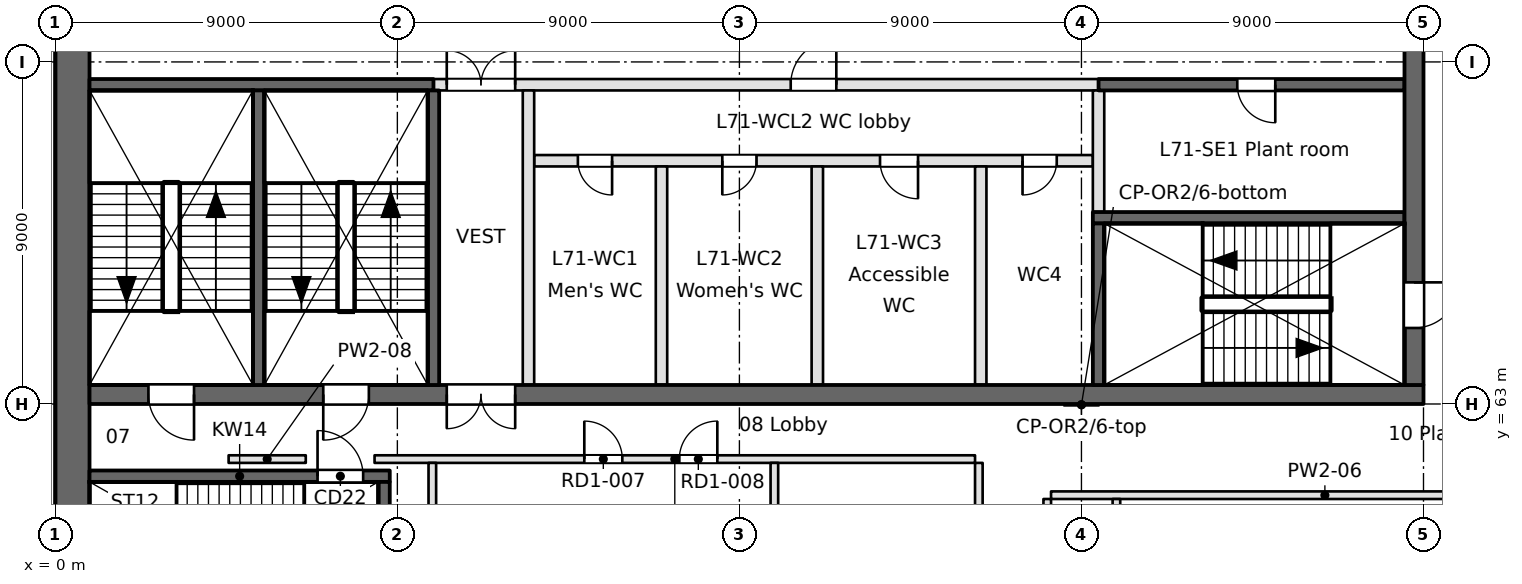
"""IFC4 building model, lengths in metres.
Left out: names, types, materials, properties, quantities, classifications, styles, units other than length and angle.
Written with IfcOpenShell. Run it as: python <this file> out.ifc"""

import sys

from ifc_helpers import new_model, si_unit, direction, frame, frame_2d, origin, place, context, subcontext, project, spatial, rectangle, extrude, element, fill, save


model = new_model("IFC4")
c1 = context("Model", 3, precision=1e-05, world=origin(), true_north=direction((0.0, 1.0)))
c2 = subcontext(c1, "Body", "Model", "MODEL_VIEW")
j1 = project(units=[si_unit("LENGTHUNIT", "METRE"), si_unit("PLANEANGLEUNIT", "RADIAN")], contexts=[c1])
p1 = place(None, origin())
s1 = spatial("IfcSite", under=j1, at=p1, CompositionType="ELEMENT")
p2 = place(p1, origin())
s2 = spatial("IfcBuilding", under=s1, at=p2, CompositionType="ELEMENT")
p3 = place(p2, frame((0.0, 0.0, 276.2)))
s3 = spatial("IfcBuildingStorey", under=s2, at=p3, CompositionType="ELEMENT", Elevation=276.2)
p4 = place(p3, frame((0.45, 94.5, 0.0), z_axis=(0.0, 0.0, 1.0), x_axis=(0.0, -1.0, 0.0)))
e1 = element("IfcWall", 1, at=p4, inside=s3, PredefinedType="SHEAR", context=c2, shape_type="SweptSolid", body=[
    extrude(rectangle(XDim=40.456, YDim=0.9, at=frame_2d((20.228, 0.0))), origin(), (0.0, 0.0, 1.0), 4.6),
])
p5 = place(p3, frame((0.9, 61.1, -0.45), z_axis=(0.0, 0.0, 1.0), x_axis=(1.0, 0.0, 0.0)))
e2 = element("IfcWall", 2, at=p5, inside=s3, PredefinedType="SOLIDWALL", context=c2, shape_type="SweptSolid", body=[
    extrude(rectangle(XDim=7.9, YDim=0.3, at=frame_2d((3.95, 0.0))), origin(), (0.0, 0.0, 1.0), 4.65),
])
p6 = place(p5, frame((6.0, 0.0, 0.45)))
e3 = element("IfcOpeningElement", 3, at=p6, cuts=e2, PredefinedType="OPENING", context=c2, shape_type="SweptSolid", body=[
    extrude(rectangle(XDim=1.2, YDim=2.1, at=frame_2d((0.6, 1.05))), frame((0.0, 0.15, 0.0), z_axis=(0.0, -1.0, 0.0), x_axis=(1.0, 0.0, 0.0)), (0.0, 0.0, 1.0), 0.3),
])
p7 = place(p3, frame((0.9, 63.25, -0.45), z_axis=(0.0, 0.0, 1.0), x_axis=(1.0, 0.0, 0.0)))
e4 = element("IfcWall", 4, at=p7, inside=s3, PredefinedType="SOLIDWALL", context=c2, shape_type="SweptSolid", body=[
    extrude(rectangle(XDim=35.1, YDim=0.5, at=frame_2d((17.55, 0.0))), origin(), (0.0, 0.0, 1.0), 4.65),
])
p8 = place(p7, frame((9.4, 0.0, 0.45)))
e5 = element("IfcOpeningElement", 5, at=p8, cuts=e4, PredefinedType="OPENING", context=c2, shape_type="SweptSolid", body=[
    extrude(rectangle(XDim=1.8, YDim=2.1, at=frame_2d((0.9, 1.05))), frame((0.0, 0.25, 0.0), z_axis=(0.0, -1.0, 0.0), x_axis=(1.0, 0.0, 0.0)), (0.0, 0.0, 1.0), 0.5),
])
p9 = place(p7, frame((1.55, 0.0, 0.45)))
e6 = element("IfcOpeningElement", 6, at=p9, cuts=e4, PredefinedType="OPENING", context=c2, shape_type="SweptSolid", body=[
    extrude(rectangle(XDim=1.2, YDim=2.1, at=frame_2d((0.6, 1.05))), frame((0.0, 0.25, 0.0), z_axis=(0.0, -1.0, 0.0), x_axis=(1.0, 0.0, 0.0)), (0.0, 0.0, 1.0), 0.5),
])
p10 = place(p7, frame((6.15, 0.0, 0.45)))
e7 = element("IfcOpeningElement", 7, at=p10, cuts=e4, PredefinedType="OPENING", context=c2, shape_type="SweptSolid", body=[
    extrude(rectangle(XDim=1.2, YDim=2.1, at=frame_2d((0.6, 1.05))), frame((0.0, 0.25, 0.0), z_axis=(0.0, -1.0, 0.0), x_axis=(1.0, 0.0, 0.0)), (0.0, 0.0, 1.0), 0.5),
])
p11 = place(p3, frame((27.3, 67.9, -0.45), z_axis=(0.0, 0.0, 1.0), x_axis=(1.0, 0.0, 0.0)))
e8 = element("IfcWall", 8, at=p11, inside=s3, PredefinedType="SOLIDWALL", context=c2, shape_type="SweptSolid", body=[
    extrude(rectangle(XDim=8.2, YDim=0.3, at=frame_2d((4.1, 0.0))), origin(), (0.0, 0.0, 1.0), 4.65),
])
p12 = place(p3, frame((12.6, 69.4, 0.0), z_axis=(0.0, 0.0, 1.0), x_axis=(1.0, 0.0, 0.0)))
e9 = element("IfcWall", 9, at=p12, inside=s3, PredefinedType="PARTITIONING", context=c2, shape_type="SweptSolid", body=[
    extrude(rectangle(XDim=14.7, YDim=0.3, at=frame_2d((7.35, 0.0))), origin(), (0.0, 0.0, 1.0), 4.2),
])
p13 = place(p12, frame((1.15, 0.0, 0.0)))
e10 = element("IfcOpeningElement", 10, at=p13, cuts=e9, PredefinedType="OPENING", context=c2, shape_type="SweptSolid", body=[
    extrude(rectangle(XDim=0.9, YDim=2.1, at=frame_2d((0.45, 1.05))), frame((0.0, 0.15, 0.0), z_axis=(0.0, -1.0, 0.0), x_axis=(1.0, 0.0, 0.0)), (0.0, 0.0, 1.0), 0.3),
])
p14 = place(p12, frame((4.95, 0.0, 0.0)))
e11 = element("IfcOpeningElement", 11, at=p14, cuts=e9, PredefinedType="OPENING", context=c2, shape_type="SweptSolid", body=[
    extrude(rectangle(XDim=0.9, YDim=2.1, at=frame_2d((0.45, 1.05))), frame((0.0, 0.15, 0.0), z_axis=(0.0, -1.0, 0.0), x_axis=(1.0, 0.0, 0.0)), (0.0, 0.0, 1.0), 0.3),
])
p15 = place(p12, frame((9.1, 0.0, 0.0)))
e12 = element("IfcOpeningElement", 12, at=p15, cuts=e9, PredefinedType="OPENING", context=c2, shape_type="SweptSolid", body=[
    extrude(rectangle(XDim=1.0, YDim=2.1, at=frame_2d((0.5, 1.05))), frame((0.0, 0.15, 0.0), z_axis=(0.0, -1.0, 0.0), x_axis=(1.0, 0.0, 0.0)), (0.0, 0.0, 1.0), 0.3),
])
p16 = place(p12, frame((12.85, 0.0, 0.0)))
e13 = element("IfcOpeningElement", 13, at=p16, cuts=e9, PredefinedType="OPENING", context=c2, shape_type="SweptSolid", body=[
    extrude(rectangle(XDim=0.9, YDim=2.1, at=frame_2d((0.45, 1.05))), frame((0.0, 0.15, 0.0), z_axis=(0.0, -1.0, 0.0), x_axis=(1.0, 0.0, 0.0)), (0.0, 0.0, 1.0), 0.3),
])
p17 = place(p3, frame((0.9, 71.4, -0.45), z_axis=(0.0, 0.0, 1.0), x_axis=(1.0, 0.0, 0.0)))
e14 = element("IfcWall", 14, at=p17, inside=s3, PredefinedType="SOLIDWALL", context=c2, shape_type="SweptSolid", body=[
    extrude(rectangle(XDim=9.05, YDim=0.3, at=frame_2d((4.525, 0.0))), origin(), (0.0, 0.0, 1.0), 4.65),
])
p18 = place(p3, frame((9.95, 71.4, 0.0), z_axis=(0.0, 0.0, 1.0), x_axis=(1.0, 0.0, 0.0)))
e15 = element("IfcWall", 15, at=p18, inside=s3, PredefinedType="PARTITIONING", context=c2, shape_type="SweptSolid", body=[
    extrude(rectangle(XDim=17.5, YDim=0.3, at=frame_2d((8.75, 0.0))), origin(), (0.0, 0.0, 1.0), 4.2),
])
p19 = place(p18, frame((0.35, 0.0, 0.0)))
e16 = element("IfcOpeningElement", 16, at=p19, cuts=e15, PredefinedType="OPENING", context=c2, shape_type="SweptSolid", body=[
    extrude(rectangle(XDim=1.8, YDim=2.1, at=frame_2d((0.9, 1.05))), frame((0.0, 0.15, 0.0), z_axis=(0.0, -1.0, 0.0), x_axis=(1.0, 0.0, 0.0)), (0.0, 0.0, 1.0), 0.3),
])
p20 = place(p18, frame((9.4, 0.0, 0.0)))
e17 = element("IfcOpeningElement", 17, at=p20, cuts=e15, PredefinedType="OPENING", context=c2, shape_type="SweptSolid", body=[
    extrude(rectangle(XDim=1.2, YDim=2.1, at=frame_2d((0.6, 1.05))), frame((0.0, 0.15, 0.0), z_axis=(0.0, -1.0, 0.0), x_axis=(1.0, 0.0, 0.0)), (0.0, 0.0, 1.0), 0.3),
])
p21 = place(p3, frame((27.45, 71.4, 0.0), z_axis=(0.0, 0.0, 1.0), x_axis=(1.0, 0.0, 0.0)))
e18 = element("IfcWall", 18, at=p21, inside=s3, PredefinedType="SOLIDWALL", context=c2, shape_type="SweptSolid", body=[
    extrude(rectangle(XDim=8.05, YDim=0.3, at=frame_2d((4.025, 0.0))), origin(), (0.0, 0.0, 1.0), 4.2),
])
p22 = place(p21, frame((3.65, 0.0, 0.0)))
e19 = element("IfcOpeningElement", 19, at=p22, cuts=e18, PredefinedType="OPENING", context=c2, shape_type="SweptSolid", body=[
    extrude(rectangle(XDim=1.0, YDim=2.1, at=frame_2d((0.5, 1.05))), frame((0.0, 0.15, 0.0), z_axis=(0.0, -1.0, 0.0), x_axis=(1.0, 0.0, 0.0)), (0.0, 0.0, 1.0), 0.3),
])
p23 = place(p3, frame((5.35, 63.5, -0.45), z_axis=(0.0, 0.0, 1.0), x_axis=(0.0, 1.0, 0.0)))
e20 = element("IfcWall", 20, at=p23, inside=s3, PredefinedType="SOLIDWALL", context=c2, shape_type="SweptSolid", body=[
    extrude(rectangle(XDim=7.75, YDim=0.3, at=frame_2d((3.875, 0.0))), origin(), (0.0, 0.0, 1.0), 4.65),
])
p24 = place(p3, frame((8.65, 56.65, -0.45), z_axis=(0.0, 0.0, 1.0), x_axis=(0.0, 1.0, 0.0)))
e21 = element("IfcWall", 21, at=p24, inside=s3, PredefinedType="SOLIDWALL", context=c2, shape_type="SweptSolid", body=[
    extrude(rectangle(XDim=4.3, YDim=0.3, at=frame_2d((2.15, 0.0))), origin(), (0.0, 0.0, 1.0), 4.65),
])
p25 = place(p3, frame((9.95, 63.5, -0.45), z_axis=(0.0, 0.0, 1.0), x_axis=(0.0, 1.0, 0.0)))
e22 = element("IfcWall", 22, at=p25, inside=s3, PredefinedType="SOLIDWALL", context=c2, shape_type="SweptSolid", body=[
    extrude(rectangle(XDim=7.75, YDim=0.3, at=frame_2d((3.875, 0.0))), origin(), (0.0, 0.0, 1.0), 4.65),
])
p26 = place(p3, frame((12.45, 63.5, 0.0), z_axis=(0.0, 0.0, 1.0), x_axis=(0.0, 1.0, 0.0)))
e23 = element("IfcWall", 23, at=p26, inside=s3, PredefinedType="PARTITIONING", context=c2, shape_type="SweptSolid", body=[
    extrude(rectangle(XDim=7.75, YDim=0.3, at=frame_2d((3.875, 0.0))), origin(), (0.0, 0.0, 1.0), 4.2),
])
for number, where, z_axis, x_axis in (
    (24, (15.95, 63.5, 0.0), (0.0, 0.0, 1.0), (0.0, 1.0, 0.0)),
    (25, (20.05, 63.5, 0.0), (0.0, 0.0, 1.0), (0.0, 1.0, 0.0)),
    (26, (24.35, 63.5, 0.0), (0.0, 0.0, 1.0), (0.0, 1.0, 0.0)),
):
    element("IfcWall", number, at=place(p3, frame(where, z_axis=z_axis, x_axis=x_axis)), inside=s3, PredefinedType="PARTITIONING", context=c2, shape_type="SweptSolid", body=[
        extrude(rectangle(XDim=5.75, YDim=0.3, at=frame_2d((2.875, 0.0))), origin(), (0.0, 0.0, 1.0), 4.2),
    ])
p27 = place(p3, frame((27.45, 63.5, -0.45), z_axis=(0.0, 0.0, 1.0), x_axis=(0.0, 1.0, 0.0)))
e27 = element("IfcWall", 27, at=p27, inside=s3, PredefinedType="SOLIDWALL", context=c2, shape_type="SweptSolid", body=[
    extrude(rectangle(XDim=4.25, YDim=0.3, at=frame_2d((2.125, 0.0))), origin(), (0.0, 0.0, 1.0), 4.65),
])
p28 = place(p3, frame((27.45, 68.05, 0.0), z_axis=(0.0, 0.0, 1.0), x_axis=(0.0, 1.0, 0.0)))
e28 = element("IfcWall", 28, at=p28, inside=s3, PredefinedType="PARTITIONING", context=c2, shape_type="SweptSolid", body=[
    extrude(rectangle(XDim=3.2, YDim=0.3, at=frame_2d((1.6, 0.0))), origin(), (0.0, 0.0, 1.0), 4.2),
])
p29 = place(p3, frame((35.75, 63.5, -0.45), z_axis=(0.0, 0.0, 1.0), x_axis=(0.0, 1.0, 0.0)))
e29 = element("IfcWall", 29, at=p29, inside=s3, PredefinedType="SOLIDWALL", context=c2, shape_type="SweptSolid", body=[
    extrude(rectangle(XDim=34.6, YDim=0.5, at=frame_2d((17.3, 0.0))), origin(), (0.0, 0.0, 1.0), 4.65),
])
p30 = place(p29, frame((9.7, 0.0, 0.45)))
e30 = element("IfcOpeningElement", 30, at=p30, cuts=e29, PredefinedType="OPENING", context=c2, shape_type="SweptSolid", body=[
    extrude(rectangle(XDim=2.4, YDim=2.1, at=frame_2d((1.2, 1.05))), frame((0.0, 0.25, 0.0), z_axis=(0.0, -1.0, 0.0), x_axis=(1.0, 0.0, 0.0)), (0.0, 0.0, 1.0), 0.5),
])
p31 = place(p29, frame((27.9, 0.0, 0.45)))
e31 = element("IfcOpeningElement", 31, at=p31, cuts=e29, PredefinedType="OPENING", context=c2, shape_type="SweptSolid", body=[
    extrude(rectangle(XDim=1.5, YDim=2.1, at=frame_2d((0.75, 1.05))), frame((0.0, 0.25, 0.0), z_axis=(0.0, -1.0, 0.0), x_axis=(1.0, 0.0, 0.0)), (0.0, 0.0, 1.0), 0.5),
])
p32 = place(p29, frame((1.5, 0.0, 0.45)))
e32 = element("IfcOpeningElement", 32, at=p32, cuts=e29, PredefinedType="OPENING", context=c2, shape_type="SweptSolid", body=[
    extrude(rectangle(XDim=1.2, YDim=2.1, at=frame_2d((0.6, 1.05))), frame((0.0, 0.25, 0.0), z_axis=(0.0, -1.0, 0.0), x_axis=(1.0, 0.0, 0.0)), (0.0, 0.0, 1.0), 0.5),
])
p33 = place(p3, frame((40.611, 60.6, 0.0), z_axis=(0.0, 0.0, 1.0), x_axis=(-1.0, 0.0, 0.0)))
e33 = element("IfcWall", 33, at=p33, inside=s3, PredefinedType="PARTITIONING", context=c2, shape_type="SweptSolid", body=[
    extrude(rectangle(XDim=14.411, YDim=0.2, at=frame_2d((7.206, 0.0))), origin(), (0.0, 0.0, 1.0), 4.2),
])
p34 = place(p3, frame((24.2, 61.55, 0.0), z_axis=(0.0, 0.0, 1.0), x_axis=(-1.0, 0.0, 0.0)))
e34 = element("IfcWall", 34, at=p34, inside=s3, PredefinedType="PARTITIONING", context=c2, shape_type="SweptSolid", body=[
    extrude(rectangle(XDim=15.8, YDim=0.2, at=frame_2d((7.9, 0.0))), origin(), (0.0, 0.0, 1.0), 4.2),
])
p35 = place(p34, frame((9.281, 0.0, 0.0)))
e35 = element("IfcOpeningElement", 35, at=p35, cuts=e34, PredefinedType="OPENING", context=c2, shape_type="SweptSolid", body=[
    extrude(rectangle(XDim=1.0, YDim=2.1, at=frame_2d((0.5, 1.05))), frame((0.0, 0.1, 0.0), z_axis=(0.0, -1.0, 0.0), x_axis=(1.0, 0.0, 0.0)), (0.0, 0.0, 1.0), 0.2),
])
p36 = place(p34, frame((6.781, 0.0, 0.0)))
e36 = element("IfcOpeningElement", 36, at=p36, cuts=e34, PredefinedType="OPENING", context=c2, shape_type="SweptSolid", body=[
    extrude(rectangle(XDim=1.0, YDim=2.1, at=frame_2d((0.5, 1.05))), frame((0.0, 0.1, 0.0), z_axis=(0.0, -1.0, 0.0), x_axis=(1.0, 0.0, 0.0)), (0.0, 0.0, 1.0), 0.2),
])
p37 = place(p3, frame((6.59, 61.55, 0.0), z_axis=(0.0, 0.0, 1.0), x_axis=(-1.0, 0.0, 0.0)))
e37 = element("IfcWall", 37, at=p37, inside=s3, PredefinedType="PARTITIONING", context=c2, shape_type="SweptSolid", body=[
    extrude(rectangle(XDim=2.03, YDim=0.2, at=frame_2d((1.015, 0.0))), origin(), (0.0, 0.0, 1.0), 4.2),
])
p38 = place(p3, frame((9.92, 38.818, 0.0), z_axis=(0.0, 0.0, 1.0), x_axis=(0.0, 1.0, 0.0)))
e38 = element("IfcWall", 38, at=p38, inside=s3, PredefinedType="PARTITIONING", context=c2, shape_type="SweptSolid", body=[
    extrude(rectangle(XDim=22.632, YDim=0.2, at=frame_2d((11.316, 0.0))), origin(), (0.0, 0.0, 1.0), 4.2),
])
p39 = place(p38, frame((10.942, 0.0, 0.0)))
e39 = element("IfcOpeningElement", 39, at=p39, cuts=e38, PredefinedType="OPENING", context=c2, shape_type="SweptSolid", body=[
    extrude(rectangle(XDim=1.0, YDim=2.1, at=frame_2d((0.5, 1.05))), frame((0.0, 0.1, 0.0), z_axis=(0.0, -1.0, 0.0), x_axis=(1.0, 0.0, 0.0)), (0.0, 0.0, 1.0), 0.2),
])
p40 = place(p38, frame((13.442, 0.0, 0.0)))
e40 = element("IfcOpeningElement", 40, at=p40, cuts=e38, PredefinedType="OPENING", context=c2, shape_type="SweptSolid", body=[
    extrude(rectangle(XDim=1.0, YDim=2.1, at=frame_2d((0.5, 1.05))), frame((0.0, 0.1, 0.0), z_axis=(0.0, -1.0, 0.0), x_axis=(1.0, 0.0, 0.0)), (0.0, 0.0, 1.0), 0.2),
])
p41 = place(p3, frame((18.92, 61.45, 0.0), z_axis=(0.0, 0.0, 1.0), x_axis=(0.0, -1.0, 0.0)))
e41 = element("IfcWall", 41, at=p41, inside=s3, PredefinedType="PARTITIONING", context=c2, shape_type="SweptSolid", body=[
    extrude(rectangle(XDim=26.735, YDim=0.2, at=frame_2d((13.367, 0.0))), origin(), (0.0, 0.0, 1.0), 4.2),
])
p42 = place(p3, frame((24.3, 46.1, 0.0), z_axis=(0.0, 0.0, 1.0), x_axis=(0.0, 1.0, 0.0)))
e42 = element("IfcWall", 42, at=p42, inside=s3, PredefinedType="PARTITIONING", context=c2, shape_type="SweptSolid", body=[
    extrude(rectangle(XDim=15.35, YDim=0.2, at=frame_2d((7.675, 0.0))), origin(), (0.0, 0.0, 1.0), 4.2),
])
p43 = place(p42, frame((7.175, 0.0, 0.0)))
e43 = element("IfcOpeningElement", 43, at=p43, cuts=e42, PredefinedType="OPENING", context=c2, shape_type="SweptSolid", body=[
    extrude(rectangle(XDim=1.0, YDim=2.1, at=frame_2d((0.5, 1.05))), frame((0.0, 0.1, 0.0), z_axis=(0.0, -1.0, 0.0), x_axis=(1.0, 0.0, 0.0)), (0.0, 0.0, 1.0), 0.2),
])
p44 = place(p42, frame((9.675, 0.0, 0.0)))
e44 = element("IfcOpeningElement", 44, at=p44, cuts=e42, PredefinedType="OPENING", context=c2, shape_type="SweptSolid", body=[
    extrude(rectangle(XDim=1.0, YDim=2.1, at=frame_2d((0.5, 1.05))), frame((0.0, 0.1, 0.0), z_axis=(0.0, -1.0, 0.0), x_axis=(1.0, 0.0, 0.0)), (0.0, 0.0, 1.0), 0.2),
])
p45 = place(p3, frame((26.1, 60.5, 0.0), z_axis=(0.0, 0.0, 1.0), x_axis=(0.0, -1.0, 0.0)))
e45 = element("IfcWall", 45, at=p45, inside=s3, PredefinedType="PARTITIONING", context=c2, shape_type="SweptSolid", body=[
    extrude(rectangle(XDim=15.0, YDim=0.2, at=frame_2d((7.5, 0.0))), origin(), (0.0, 0.0, 1.0), 4.2),
])
p46 = place(p3, frame((27.92, 60.5, 0.0), z_axis=(0.0, 0.0, 1.0), x_axis=(0.0, -1.0, 0.0)))
e46 = element("IfcWall", 46, at=p46, inside=s3, PredefinedType="PARTITIONING", context=c2, shape_type="SweptSolid", body=[
    extrude(rectangle(XDim=25.419, YDim=0.2, at=frame_2d((12.709, 0.0))), origin(), (0.0, 0.0, 1.0), 4.2),
])
p47 = place(p8, frame((1.8, 0.0, 0.0), z_axis=(0.0, 0.0, 1.0), x_axis=(-1.0, 0.0, 0.0)))
e47 = element("IfcDoor", 47, at=p47, inside=s3, OperationType="DOUBLE_DOOR_SINGLE_SWING", PredefinedType="DOOR", context=c2, shape_type="SweptSolid", body=[
    extrude(rectangle(XDim=1.8, YDim=2.1, at=frame_2d((0.9, 1.05))), frame((0.0, 0.025, 0.0), z_axis=(0.0, -1.0, 0.0), x_axis=(1.0, 0.0, 0.0)), (0.0, 0.0, 1.0), 0.05),
])
fill(e5, e47)
p48 = place(p19, origin())
e48 = element("IfcDoor", 48, at=p48, inside=s3, OperationType="DOUBLE_DOOR_SINGLE_SWING", PredefinedType="DOOR", context=c2, shape_type="SweptSolid", body=[
    extrude(rectangle(XDim=1.8, YDim=2.1, at=frame_2d((0.9, 1.05))), frame((0.0, 0.025, 0.0), z_axis=(0.0, -1.0, 0.0), x_axis=(1.0, 0.0, 0.0)), (0.0, 0.0, 1.0), 0.05),
])
fill(e16, e48)
p49 = place(p13, frame((0.9, 0.0, 0.0), z_axis=(0.0, 0.0, 1.0), x_axis=(-1.0, 0.0, 0.0)))
e49 = element("IfcDoor", 49, at=p49, inside=s3, OperationType="SINGLE_SWING_LEFT", PredefinedType="DOOR", context=c2, shape_type="SweptSolid", body=[
    extrude(rectangle(XDim=0.9, YDim=2.1, at=frame_2d((0.45, 1.05))), frame((0.0, 0.025, 0.0), z_axis=(0.0, -1.0, 0.0), x_axis=(1.0, 0.0, 0.0)), (0.0, 0.0, 1.0), 0.05),
])
fill(e10, e49)
p50 = place(p14, frame((0.9, 0.0, 0.0), z_axis=(0.0, 0.0, 1.0), x_axis=(-1.0, 0.0, 0.0)))
e50 = element("IfcDoor", 50, at=p50, inside=s3, OperationType="SINGLE_SWING_RIGHT", PredefinedType="DOOR", context=c2, shape_type="SweptSolid", body=[
    extrude(rectangle(XDim=0.9, YDim=2.1, at=frame_2d((0.45, 1.05))), frame((0.0, 0.025, 0.0), z_axis=(0.0, -1.0, 0.0), x_axis=(1.0, 0.0, 0.0)), (0.0, 0.0, 1.0), 0.05),
])
fill(e11, e50)
p51 = place(p15, frame((1.0, 0.0, 0.0), z_axis=(0.0, 0.0, 1.0), x_axis=(-1.0, 0.0, 0.0)))
e51 = element("IfcDoor", 51, at=p51, inside=s3, OperationType="SINGLE_SWING_LEFT", PredefinedType="DOOR", context=c2, shape_type="SweptSolid", body=[
    extrude(rectangle(XDim=1.0, YDim=2.1, at=frame_2d((0.5, 1.05))), frame((0.0, 0.025, 0.0), z_axis=(0.0, -1.0, 0.0), x_axis=(1.0, 0.0, 0.0)), (0.0, 0.0, 1.0), 0.05),
])
fill(e12, e51)
p52 = place(p16, frame((0.9, 0.0, 0.0), z_axis=(0.0, 0.0, 1.0), x_axis=(-1.0, 0.0, 0.0)))
e52 = element("IfcDoor", 52, at=p52, inside=s3, OperationType="SINGLE_SWING_RIGHT", PredefinedType="DOOR", context=c2, shape_type="SweptSolid", body=[
    extrude(rectangle(XDim=0.9, YDim=2.1, at=frame_2d((0.45, 1.05))), frame((0.0, 0.025, 0.0), z_axis=(0.0, -1.0, 0.0), x_axis=(1.0, 0.0, 0.0)), (0.0, 0.0, 1.0), 0.05),
])
fill(e13, e52)
p53 = place(p20, origin())
e53 = element("IfcDoor", 53, at=p53, inside=s3, OperationType="SINGLE_SWING_RIGHT", PredefinedType="DOOR", context=c2, shape_type="SweptSolid", body=[
    extrude(rectangle(XDim=1.2, YDim=2.1, at=frame_2d((0.6, 1.05))), frame((0.0, 0.025, 0.0), z_axis=(0.0, -1.0, 0.0), x_axis=(1.0, 0.0, 0.0)), (0.0, 0.0, 1.0), 0.05),
])
fill(e17, e53)
p54 = place(p9, frame((1.2, 0.0, 0.0), z_axis=(0.0, 0.0, 1.0), x_axis=(-1.0, 0.0, 0.0)))
e54 = element("IfcDoor", 54, at=p54, inside=s3, OperationType="SINGLE_SWING_LEFT", PredefinedType="DOOR", context=c2, shape_type="SweptSolid", body=[
    extrude(rectangle(XDim=1.2, YDim=2.1, at=frame_2d((0.6, 1.05))), frame((0.0, 0.025, 0.0), z_axis=(0.0, -1.0, 0.0), x_axis=(1.0, 0.0, 0.0)), (0.0, 0.0, 1.0), 0.05),
])
fill(e6, e54)
p55 = place(p10, frame((1.2, 0.0, 0.0), z_axis=(0.0, 0.0, 1.0), x_axis=(-1.0, 0.0, 0.0)))
e55 = element("IfcDoor", 55, at=p55, inside=s3, OperationType="SINGLE_SWING_RIGHT", PredefinedType="DOOR", context=c2, shape_type="SweptSolid", body=[
    extrude(rectangle(XDim=1.2, YDim=2.1, at=frame_2d((0.6, 1.05))), frame((0.0, 0.025, 0.0), z_axis=(0.0, -1.0, 0.0), x_axis=(1.0, 0.0, 0.0)), (0.0, 0.0, 1.0), 0.05),
])
fill(e7, e55)
p56 = place(p32, frame((1.2, 0.0, 0.0), z_axis=(0.0, 0.0, 1.0), x_axis=(-1.0, 0.0, 0.0)))
e56 = element("IfcDoor", 56, at=p56, inside=s3, OperationType="SINGLE_SWING_LEFT", PredefinedType="DOOR", context=c2, shape_type="SweptSolid", body=[
    extrude(rectangle(XDim=1.2, YDim=2.1, at=frame_2d((0.6, 1.05))), frame((0.0, 0.025, 0.0), z_axis=(0.0, -1.0, 0.0), x_axis=(1.0, 0.0, 0.0)), (0.0, 0.0, 1.0), 0.05),
])
fill(e32, e56)
p57 = place(p6, origin())
e57 = element("IfcDoor", 57, at=p57, inside=s3, OperationType="SINGLE_SWING_LEFT", PredefinedType="DOOR", context=c2, shape_type="SweptSolid", body=[
    extrude(rectangle(XDim=1.2, YDim=2.1, at=frame_2d((0.6, 1.05))), frame((0.0, 0.025, 0.0), z_axis=(0.0, -1.0, 0.0), x_axis=(1.0, 0.0, 0.0)), (0.0, 0.0, 1.0), 0.05),
])
fill(e3, e57)
p58 = place(p22, frame((1.0, 0.0, 0.0), z_axis=(0.0, 0.0, 1.0), x_axis=(-1.0, 0.0, 0.0)))
e58 = element("IfcDoor", 58, at=p58, inside=s3, OperationType="SINGLE_SWING_LEFT", PredefinedType="DOOR", context=c2, shape_type="SweptSolid", body=[
    extrude(rectangle(XDim=1.0, YDim=2.1, at=frame_2d((0.5, 1.05))), frame((0.0, 0.025, 0.0), z_axis=(0.0, -1.0, 0.0), x_axis=(1.0, 0.0, 0.0)), (0.0, 0.0, 1.0), 0.05),
])
fill(e19, e58)
p59 = place(p35, frame((1.0, 0.0, 0.0), z_axis=(0.0, 0.0, 1.0), x_axis=(-1.0, 0.0, 0.0)))
e59 = element("IfcDoor", 59, at=p59, inside=s3, OperationType="SINGLE_SWING_LEFT", PredefinedType="DOOR", context=c2, shape_type="SweptSolid", body=[
    extrude(rectangle(XDim=1.0, YDim=2.1, at=frame_2d((0.5, 1.05))), frame((0.0, 0.025, 0.0), z_axis=(0.0, -1.0, 0.0), x_axis=(1.0, 0.0, 0.0)), (0.0, 0.0, 1.0), 0.05),
])
fill(e35, e59)
p60 = place(p36, frame((1.0, 0.0, 0.0), z_axis=(0.0, 0.0, 1.0), x_axis=(-1.0, 0.0, 0.0)))
e60 = element("IfcDoor", 60, at=p60, inside=s3, OperationType="SINGLE_SWING_RIGHT", PredefinedType="DOOR", context=c2, shape_type="SweptSolid", body=[
    extrude(rectangle(XDim=1.0, YDim=2.1, at=frame_2d((0.5, 1.05))), frame((0.0, 0.025, 0.0), z_axis=(0.0, -1.0, 0.0), x_axis=(1.0, 0.0, 0.0)), (0.0, 0.0, 1.0), 0.05),
])
fill(e36, e60)
save(model, sys.argv[1])
